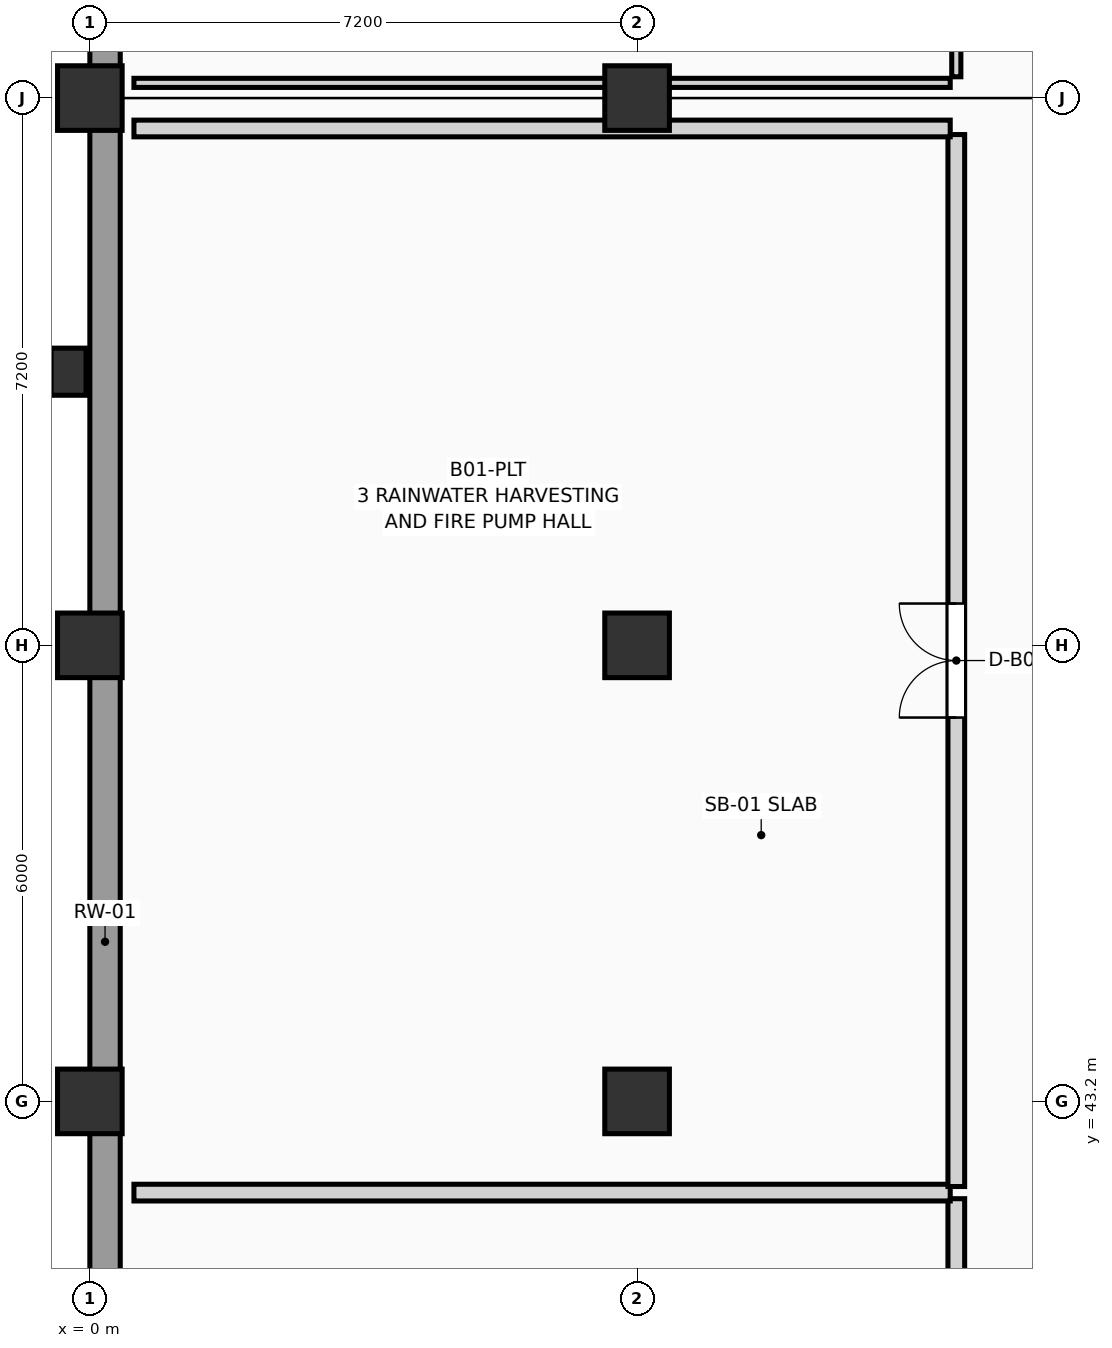
"""IFC4 building model, lengths in metres.
Left out: names, types, materials, properties, quantities, classifications, styles, units other than length and angle.
Written with IfcOpenShell. Run it as: python <this file> out.ifc"""

import sys

from ifc_helpers import new_model, si_unit, direction, frame, frame_2d, origin, origin_2d, place, context, subcontext, project, spatial, rectangle, extrude, element, fill, save


model = new_model("IFC4")
c1 = context("Model", 3, precision=1e-05, world=origin(), true_north=direction((0.0, 1.0)))
c2 = subcontext(c1, "Body", "Model", "MODEL_VIEW")
j1 = project(units=[si_unit("LENGTHUNIT", "METRE"), si_unit("PLANEANGLEUNIT", "RADIAN")], contexts=[c1])
p1 = place(None, origin())
s1 = spatial("IfcSite", under=j1, at=p1, CompositionType="ELEMENT")
p2 = place(p1, origin())
s2 = spatial("IfcBuilding", under=s1, at=p2, CompositionType="ELEMENT")
p3 = place(p2, frame((0.0, 0.0, -4.5)))
s3 = spatial("IfcBuildingStorey", under=s2, at=p3, CompositionType="ELEMENT", Elevation=-4.5)
for number, where, z_axis, x_axis in (
    (1, (0.0, 43.2, -0.3), (0.0, 0.0, 1.0), (1.0, 0.0, 0.0)),
    (2, (0.0, 49.2, -0.3), (0.0, 0.0, 1.0), (1.0, 0.0, 0.0)),
    (3, (0.0, 56.4, -0.3), (0.0, 0.0, 1.0), (1.0, 0.0, 0.0)),
    (4, (7.2, 43.2, -0.3), (0.0, 0.0, 1.0), (1.0, 0.0, 0.0)),
    (5, (7.2, 49.2, -0.3), (0.0, 0.0, 1.0), (1.0, 0.0, 0.0)),
    (6, (7.2, 56.4, -0.3), (0.0, 0.0, 1.0), (1.0, 0.0, 0.0)),
):
    element("IfcColumn", number, at=place(p3, frame(where, z_axis=z_axis, x_axis=x_axis)), inside=s3, PredefinedType="COLUMN", context=c2, shape_type="SweptSolid", body=[
        extrude(rectangle(XDim=0.85, YDim=0.85, at=origin_2d()), origin(), (0.0, 0.0, 1.0), 4.8),
    ])
p4 = place(p3, frame((-0.28, 52.8, -0.3), z_axis=(0.0, 0.0, 1.0), x_axis=(1.0, 0.0, 0.0)))
e7 = element("IfcColumn", 7, at=p4, inside=s3, PredefinedType="PILASTER", context=c2, shape_type="SweptSolid", body=[
    extrude(rectangle(XDim=0.46, YDim=0.62, at=origin_2d()), origin(), (0.0, 0.0, 1.0), 4.8),
])
p5 = place(p3, frame((0.2, 0.0, -0.3), z_axis=(0.0, 0.0, 1.0), x_axis=(0.0, 1.0, 0.0)))
e8 = element("IfcWall", 8, at=p5, inside=s3, PredefinedType="USERDEFINED", context=c2, shape_type="SweptSolid", body=[
    extrude(rectangle(XDim=56.4, YDim=0.4, at=frame_2d((28.2, 0.0))), origin(), (0.0, 0.0, 1.0), 4.54),
])
p6 = place(p3, frame((0.2, 56.4, -0.3), z_axis=(0.0, 0.0, 1.0), x_axis=(0.0, 1.0, 0.0)))
e9 = element("IfcWall", 9, at=p6, inside=s3, PredefinedType="USERDEFINED", context=c2, shape_type="SweptSolid", body=[
    extrude(rectangle(XDim=28.8, YDim=0.4, at=frame_2d((14.4, 0.0))), origin(), (0.0, 0.0, 1.0), 4.54),
])
p7 = place(p3, frame((11.4, 24.08, 0.0), z_axis=(0.0, 0.0, 1.0), x_axis=(0.0, 1.0, 0.0)))
e10 = element("IfcWall", 10, at=p7, inside=s3, PredefinedType="PARTITIONING", context=c2, shape_type="SweptSolid", body=[
    extrude(rectangle(XDim=17.84, YDim=0.22, at=frame_2d((8.92, 0.0))), origin(), (0.0, 0.0, 1.0), 4.225),
])
p8 = place(p7, frame((8.17, 0.0, 0.0)))
e11 = element("IfcOpeningElement", 11, at=p8, cuts=e10, PredefinedType="OPENING", context=c2, shape_type="SweptSolid", body=[
    extrude(rectangle(XDim=1.5, YDim=2.25, at=frame_2d((0.75, 1.125))), frame((0.0, 0.122, 0.0), z_axis=(0.0, -1.0, 0.0), x_axis=(1.0, 0.0, 0.0)), (0.0, 0.0, 1.0), 0.244),
])
p9 = place(p3, frame((0.58, 42.0, 0.0), z_axis=(0.0, 0.0, 1.0), x_axis=(1.0, 0.0, 0.0)))
e12 = element("IfcWall", 12, at=p9, inside=s3, PredefinedType="PARTITIONING", context=c2, shape_type="SweptSolid", body=[
    extrude(rectangle(XDim=10.74, YDim=0.22, at=frame_2d((5.37, 0.0))), origin(), (0.0, 0.0, 1.0), 4.225),
])
p10 = place(p3, frame((11.4, 42.08, 0.0), z_axis=(0.0, 0.0, 1.0), x_axis=(0.0, 1.0, 0.0)))
e13 = element("IfcWall", 13, at=p10, inside=s3, PredefinedType="PARTITIONING", context=c2, shape_type="SweptSolid", body=[
    extrude(rectangle(XDim=13.84, YDim=0.22, at=frame_2d((6.92, 0.0))), origin(), (0.0, 0.0, 1.0), 4.225),
])
p11 = place(p10, frame((6.17, 0.0, 0.0)))
e14 = element("IfcOpeningElement", 14, at=p11, cuts=e13, PredefinedType="OPENING", context=c2, shape_type="SweptSolid", body=[
    extrude(rectangle(XDim=1.5, YDim=2.25, at=frame_2d((0.75, 1.125))), frame((0.0, 0.122, 0.0), z_axis=(0.0, -1.0, 0.0), x_axis=(1.0, 0.0, 0.0)), (0.0, 0.0, 1.0), 0.244),
])
p12 = place(p3, frame((0.58, 56.0, 0.0), z_axis=(0.0, 0.0, 1.0), x_axis=(1.0, 0.0, 0.0)))
e15 = element("IfcWall", 15, at=p12, inside=s3, PredefinedType="PARTITIONING", context=c2, shape_type="SweptSolid", body=[
    extrude(rectangle(XDim=10.74, YDim=0.22, at=frame_2d((5.37, 0.0))), origin(), (0.0, 0.0, 1.0), 3.375),
])
p13 = place(p3, frame((0.58, 56.6, 0.0), z_axis=(0.0, 0.0, 1.0), x_axis=(1.0, 0.0, 0.0)))
e16 = element("IfcWall", 16, at=p13, inside=s3, PredefinedType="PARTITIONING", context=c2, shape_type="SweptSolid", body=[
    extrude(rectangle(XDim=10.74, YDim=0.12, at=frame_2d((5.37, 0.0))), origin(), (0.0, 0.0, 1.0), 3.375),
])
p14 = place(p3, frame((11.4, 56.68, 0.0), z_axis=(0.0, 0.0, 1.0), x_axis=(0.0, 1.0, 0.0)))
e17 = element("IfcWall", 17, at=p14, inside=s3, PredefinedType="PARTITIONING", context=c2, shape_type="SweptSolid", body=[
    extrude(rectangle(XDim=28.44, YDim=0.12, at=frame_2d((14.22, 0.0))), origin(), (0.0, 0.0, 1.0), 4.225),
])
p15 = place(p14, frame((13.37, 0.0, 0.0)))
e18 = element("IfcOpeningElement", 18, at=p15, cuts=e17, PredefinedType="OPENING", context=c2, shape_type="SweptSolid", body=[
    extrude(rectangle(XDim=1.7, YDim=2.28, at=frame_2d((0.85, 1.14))), frame((0.0, 0.072, 0.0), z_axis=(0.0, -1.0, 0.0), x_axis=(1.0, 0.0, 0.0)), (0.0, 0.0, 1.0), 0.144),
])
p16 = place(p11, origin())
e19 = element("IfcDoor", 19, at=p16, inside=s3, OperationType="DOUBLE_DOOR_SINGLE_SWING", PredefinedType="DOOR", context=c2, shape_type="SweptSolid", body=[
    extrude(rectangle(XDim=1.5, YDim=2.25, at=frame_2d((0.75, 1.125))), frame((0.0, 0.025, 0.0), z_axis=(0.0, -1.0, 0.0), x_axis=(1.0, 0.0, 0.0)), (0.0, 0.0, 1.0), 0.05),
])
fill(e14, e19)
save(model, sys.argv[1])
